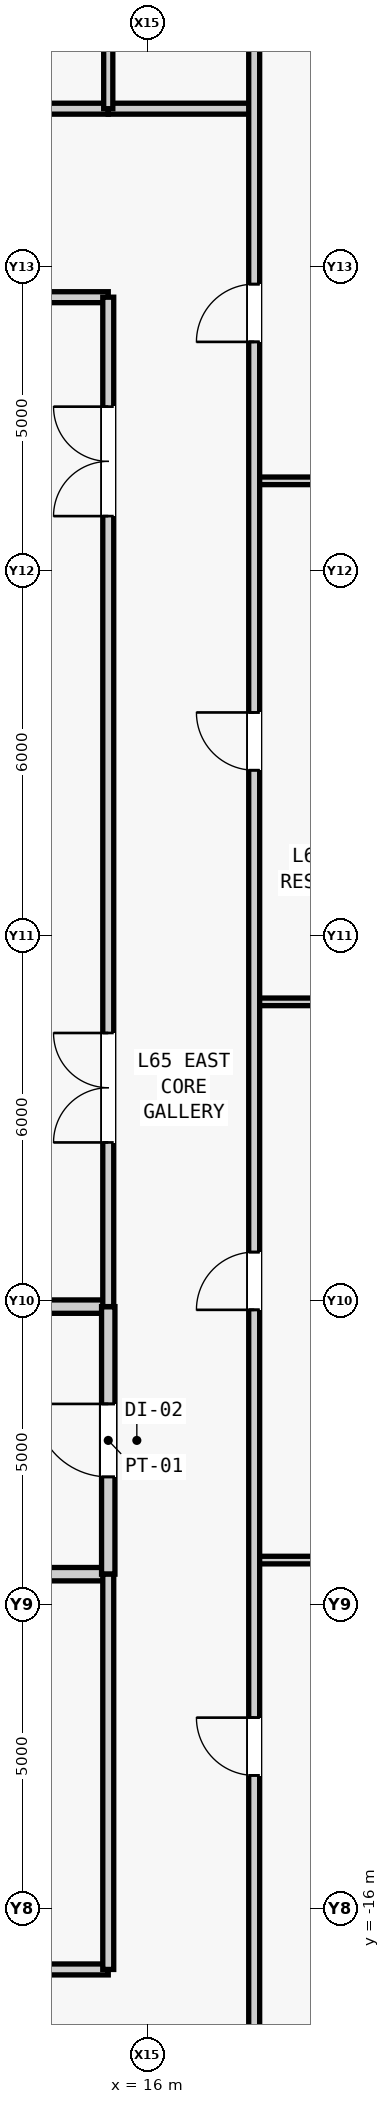
"""IFC4 building model, lengths in metres.
Left out: names, types, materials, properties, quantities, classifications, styles, units other than length and angle.
Written with IfcOpenShell. Run it as: python <this file> out.ifc"""

import sys

from ifc_helpers import new_model, si_unit, direction, frame, frame_2d, origin, place, context, subcontext, project, spatial, rectangle, extrude, source, transform, mapped, element, fill, save


model = new_model("IFC4")
c1 = context("Model", 3, precision=1e-05, world=origin(), true_north=direction((0.0, 1.0)))
c2 = subcontext(c1, "Body", "Model", "MODEL_VIEW")
j1 = project(units=[si_unit("LENGTHUNIT", "METRE"), si_unit("PLANEANGLEUNIT", "RADIAN")], contexts=[c1])
p1 = place(None, origin())
s1 = spatial("IfcSite", under=j1, at=p1, CompositionType="ELEMENT")
p2 = place(p1, origin())
s2 = spatial("IfcBuilding", under=s1, at=p2, CompositionType="ELEMENT")
p3 = place(p2, frame((0.0, 0.0, 277.5)))
s3 = spatial("IfcBuildingStorey", under=s2, at=p3, CompositionType="ELEMENT", Elevation=277.5)
m1 = source(origin(), c2, "Body", "SweptSolid", [
    extrude(rectangle(XDim=4.05, YDim=0.22, at=frame_2d((2.025, 0.0))), origin(), (0.0, 0.0, 1.0), 3.78),
])
p4 = place(p3, frame((11.3, -10.5, 0.0), z_axis=(0.0, 0.0, 1.0), x_axis=(1.0, 0.0, 0.0)))
e1 = element("IfcWall", 1, at=p4, inside=s3, PredefinedType="PARTITIONING", context=c2, shape_type="MappedRepresentation", body=[
    mapped(m1, transform((0.0, 0.0, 0.0), scale=1.0)),
])
m2 = source(origin(), c2, "Body", "SweptSolid", [
    extrude(rectangle(XDim=4.05, YDim=0.22, at=frame_2d((2.025, 0.0))), origin(), (0.0, 0.0, 1.0), 3.085),
])
p5 = place(p3, frame((11.3, -6.1, 0.0), z_axis=(0.0, 0.0, 1.0), x_axis=(1.0, 0.0, 0.0)))
e2 = element("IfcWall", 2, at=p5, inside=s3, PredefinedType="PARTITIONING", context=c2, shape_type="MappedRepresentation", body=[
    mapped(m2, transform((0.0, 0.0, 0.0), scale=1.0)),
])
m3 = source(origin(), c2, "Body", "SweptSolid", [
    extrude(rectangle(XDim=4.4, YDim=0.22, at=frame_2d((2.2, 0.0))), origin(), (0.0, 0.0, 1.0), 3.78),
])
p6 = place(p3, frame((15.35, -10.5, 0.0), z_axis=(0.0, 0.0, 1.0), x_axis=(0.0, 1.0, 0.0)))
e3 = element("IfcWall", 3, at=p6, inside=s3, PredefinedType="PARTITIONING", context=c2, shape_type="MappedRepresentation", body=[
    mapped(m3, transform((0.0, 0.0, 0.0), scale=1.0)),
])
m4 = source(origin(), c2, "Body", "SweptSolid", [
    extrude(rectangle(XDim=1.2, YDim=2.2, at=frame_2d((0.6, 1.1))), frame((0.0, 0.12, 0.0), z_axis=(0.0, -1.0, 0.0), x_axis=(1.0, 0.0, 0.0)), (0.0, 0.0, 1.0), 0.24),
])
p7 = place(p6, frame((1.6, 0.0, 0.0)))
e4 = element("IfcOpeningElement", 4, at=p7, cuts=e3, PredefinedType="OPENING", context=c2, shape_type="MappedRepresentation", body=[
    mapped(m4, transform((0.0, 0.0, 0.0), scale=1.0)),
])
m5 = source(origin(), c2, "Body", "SweptSolid", [
    extrude(rectangle(XDim=4.05, YDim=0.18, at=frame_2d((2.025, 0.0))), origin(), (0.0, 0.0, 1.0), 3.78),
])
p8 = place(p3, frame((11.3, 10.5, 0.0), z_axis=(0.0, 0.0, 1.0), x_axis=(1.0, 0.0, 0.0)))
e5 = element("IfcWall", 5, at=p8, inside=s3, PredefinedType="PARTITIONING", context=c2, shape_type="MappedRepresentation", body=[
    mapped(m5, transform((0.0, 0.0, 0.0), scale=1.0)),
])
m6 = source(origin(), c2, "Body", "SweptSolid", [
    extrude(rectangle(XDim=16.6, YDim=0.18, at=frame_2d((8.3, 0.0))), origin(), (0.0, 0.0, 1.0), 3.78),
])
p9 = place(p3, frame((15.35, -6.1, 0.0), z_axis=(0.0, 0.0, 1.0), x_axis=(0.0, 1.0, 0.0)))
e6 = element("IfcWall", 6, at=p9, inside=s3, PredefinedType="PARTITIONING", context=c2, shape_type="MappedRepresentation", body=[
    mapped(m6, transform((0.0, 0.0, 0.0), scale=1.0)),
])
m7 = source(origin(), c2, "Body", "SweptSolid", [
    extrude(rectangle(XDim=1.8, YDim=2.25, at=frame_2d((0.9, 1.125))), frame((0.0, 0.1, 0.0), z_axis=(0.0, -1.0, 0.0), x_axis=(1.0, 0.0, 0.0)), (0.0, 0.0, 1.0), 0.2),
])
p10 = place(p9, frame((2.7, 0.0, 0.0)))
e7 = element("IfcOpeningElement", 7, at=p10, cuts=e6, PredefinedType="OPENING", context=c2, shape_type="MappedRepresentation", body=[
    mapped(m7, transform((0.0, 0.0, 0.0), scale=1.0)),
])
p11 = place(p9, frame((13.0, 0.0, 0.0)))
e8 = element("IfcOpeningElement", 8, at=p11, cuts=e6, PredefinedType="OPENING", context=c2, shape_type="MappedRepresentation", body=[
    mapped(m7, transform((0.0, 0.0, 0.0), scale=1.0)),
])
m8 = source(origin(), c2, "Body", "SweptSolid", [
    extrude(rectangle(XDim=14.05, YDim=0.18, at=frame_2d((7.025, 0.0))), origin(), (0.0, 0.0, 1.0), 3.78),
])
p12 = place(p3, frame((1.3, -17.0, 0.0), z_axis=(0.0, 0.0, 1.0), x_axis=(1.0, 0.0, 0.0)))
e9 = element("IfcWall", 9, at=p12, inside=s3, PredefinedType="PARTITIONING", context=c2, shape_type="MappedRepresentation", body=[
    mapped(m8, transform((0.0, 0.0, 0.0), scale=1.0)),
])
m9 = source(origin(), c2, "Body", "SweptSolid", [
    extrude(rectangle(XDim=0.9, YDim=2.15, at=frame_2d((0.45, 1.075))), frame((0.0, 0.1, 0.0), z_axis=(0.0, -1.0, 0.0), x_axis=(1.0, 0.0, 0.0)), (0.0, 0.0, 1.0), 0.2),
])
p13 = place(p12, frame((6.25, 0.0, 0.0)))
e10 = element("IfcOpeningElement", 10, at=p13, cuts=e9, PredefinedType="OPENING", context=c2, shape_type="MappedRepresentation", body=[
    mapped(m9, transform((0.0, 0.0, 0.0), scale=1.0)),
])
m10 = source(origin(), c2, "Body", "SweptSolid", [
    extrude(rectangle(XDim=6.5, YDim=0.18, at=frame_2d((3.25, 0.0))), origin(), (0.0, 0.0, 1.0), 3.78),
])
p14 = place(p3, frame((15.35, -17.0, 0.0), z_axis=(0.0, 0.0, 1.0), x_axis=(0.0, 1.0, 0.0)))
e11 = element("IfcWall", 11, at=p14, inside=s3, PredefinedType="PARTITIONING", context=c2, shape_type="MappedRepresentation", body=[
    mapped(m10, transform((0.0, 0.0, 0.0), scale=1.0)),
])
m11 = source(origin(), c2, "Body", "SweptSolid", [
    extrude(rectangle(XDim=2.4, YDim=0.18, at=frame_2d((1.2, 0.0))), origin(), (0.0, 0.0, 1.0), 3.78),
])
p15 = place(p3, frame((15.35, 13.6, 0.0), z_axis=(0.0, 0.0, 1.0), x_axis=(1.0, 0.0, 0.0)))
e12 = element("IfcWall", 12, at=p15, inside=s3, PredefinedType="PARTITIONING", context=c2, shape_type="MappedRepresentation", body=[
    mapped(m11, transform((0.0, 0.0, 0.0), scale=1.0)),
])
m12 = source(origin(), c2, "Body", "SweptSolid", [
    extrude(rectangle(XDim=32.75, YDim=0.18, at=frame_2d((16.375, 0.0))), origin(), (0.0, 0.0, 1.0), 3.78),
])
p16 = place(p3, frame((-17.4, 13.6, 0.0), z_axis=(0.0, 0.0, 1.0), x_axis=(1.0, 0.0, 0.0)))
e13 = element("IfcWall", 13, at=p16, inside=s3, PredefinedType="PARTITIONING", context=c2, shape_type="MappedRepresentation", body=[
    mapped(m12, transform((0.0, 0.0, 0.0), scale=1.0)),
])
m13 = source(origin(), c2, "Body", "SweptSolid", [
    extrude(rectangle(XDim=1.05, YDim=2.2, at=frame_2d((0.525, 1.1))), frame((0.0, 0.1, 0.0), z_axis=(0.0, -1.0, 0.0), x_axis=(1.0, 0.0, 0.0)), (0.0, 0.0, 1.0), 0.2),
])
p17 = place(p16, frame((27.075, 0.0, 0.0)))
e14 = element("IfcOpeningElement", 14, at=p17, cuts=e13, PredefinedType="OPENING", context=c2, shape_type="MappedRepresentation", body=[
    mapped(m13, transform((0.0, 0.0, 0.0), scale=1.0)),
])
m14 = source(origin(), c2, "Body", "SweptSolid", [
    extrude(rectangle(XDim=14.4, YDim=0.15, at=frame_2d((7.2, 0.0))), origin(), (0.0, 0.0, 1.0), 3.78),
])
p18 = place(p3, frame((15.35, 13.6, 0.0), z_axis=(0.0, 0.0, 1.0), x_axis=(0.0, 1.0, 0.0)))
e15 = element("IfcWall", 15, at=p18, inside=s3, PredefinedType="PARTITIONING", context=c2, shape_type="MappedRepresentation", body=[
    mapped(m14, transform((0.0, 0.0, 0.0), scale=1.0)),
])
m15 = source(origin(), c2, "Body", "SweptSolid", [
    extrude(rectangle(XDim=10.25, YDim=0.125, at=frame_2d((5.125, 0.0))), origin(), (0.0, 0.0, 1.0), 3.78),
])
for number, where, z_axis, x_axis in (
    (16, (17.75, -10.268, 0.0), (0.0, 0.0, 1.0), (1.0, 0.0, 0.0)),
    (17, (17.75, -1.088, 0.0), (0.0, 0.0, 1.0), (1.0, 0.0, 0.0)),
    (18, (17.75, 7.48, 0.0), (0.0, 0.0, 1.0), (1.0, 0.0, 0.0)),
):
    element("IfcWall", number, at=place(p3, frame(where, z_axis=z_axis, x_axis=x_axis)), inside=s3, PredefinedType="PARTITIONING", context=c2, shape_type="MappedRepresentation", body=[
        mapped(m15, transform((0.0, 0.0, 0.0), scale=1.0)),
    ])
m16 = source(origin(), c2, "Body", "SweptSolid", [
    extrude(rectangle(XDim=41.9, YDim=0.18, at=frame_2d((20.95, 0.0))), origin(), (0.0, 0.0, 1.0), 3.78),
])
p19 = place(p3, frame((17.75, -19.4, 0.0), z_axis=(0.0, 0.0, 1.0), x_axis=(0.0, 1.0, 0.0)))
e19 = element("IfcWall", 19, at=p19, inside=s3, PredefinedType="PARTITIONING", context=c2, shape_type="MappedRepresentation", body=[
    mapped(m16, transform((0.0, 0.0, 0.0), scale=1.0)),
])
m17 = source(origin(), c2, "Body", "SweptSolid", [
    extrude(rectangle(XDim=0.95, YDim=2.15, at=frame_2d((0.475, 1.075))), frame((0.0, 0.1, 0.0), z_axis=(0.0, -1.0, 0.0), x_axis=(1.0, 0.0, 0.0)), (0.0, 0.0, 1.0), 0.2),
])
p20 = place(p19, frame((5.591, 0.0, 0.0)))
e20 = element("IfcOpeningElement", 20, at=p20, cuts=e19, PredefinedType="OPENING", context=c2, shape_type="MappedRepresentation", body=[
    mapped(m17, transform((0.0, 0.0, 0.0), scale=1.0)),
])
p21 = place(p19, frame((13.247, 0.0, 0.0)))
e21 = element("IfcOpeningElement", 21, at=p21, cuts=e19, PredefinedType="OPENING", context=c2, shape_type="MappedRepresentation", body=[
    mapped(m17, transform((0.0, 0.0, 0.0), scale=1.0)),
])
p22 = place(p19, frame((22.121, 0.0, 0.0)))
e22 = element("IfcOpeningElement", 22, at=p22, cuts=e19, PredefinedType="OPENING", context=c2, shape_type="MappedRepresentation", body=[
    mapped(m17, transform((0.0, 0.0, 0.0), scale=1.0)),
])
p23 = place(p19, frame((29.165, 0.0, 0.0)))
e23 = element("IfcOpeningElement", 23, at=p23, cuts=e19, PredefinedType="OPENING", context=c2, shape_type="MappedRepresentation", body=[
    mapped(m17, transform((0.0, 0.0, 0.0), scale=1.0)),
])
m18 = source(origin(), c2, "Body", "SweptSolid", [
    extrude(rectangle(XDim=1.2, YDim=2.2, at=frame_2d((0.6, 1.1))), frame((0.0, 0.025, 0.0), z_axis=(0.0, -1.0, 0.0), x_axis=(1.0, 0.0, 0.0)), (0.0, 0.0, 1.0), 0.05),
])
p24 = place(p7, origin())
e24 = element("IfcDoor", 24, at=p24, inside=s3, OperationType="SINGLE_SWING_RIGHT", PredefinedType="DOOR", context=c2, shape_type="MappedRepresentation", body=[
    mapped(m18, transform((0.0, 0.0, 0.0), scale=1.0)),
])
fill(e4, e24)
m19 = source(origin(), c2, "Body", "SweptSolid", [
    extrude(rectangle(XDim=1.8, YDim=2.25, at=frame_2d((0.9, 1.125))), frame((0.0, 0.025, 0.0), z_axis=(0.0, -1.0, 0.0), x_axis=(1.0, 0.0, 0.0)), (0.0, 0.0, 1.0), 0.05),
])
p25 = place(p10, origin())
e25 = element("IfcDoor", 25, at=p25, inside=s3, OperationType="SINGLE_SWING_RIGHT", PredefinedType="DOOR", context=c2, shape_type="MappedRepresentation", body=[
    mapped(m19, transform((0.0, 0.0, 0.0), scale=1.0)),
])
fill(e7, e25)
p26 = place(p11, origin())
e26 = element("IfcDoor", 26, at=p26, inside=s3, OperationType="SINGLE_SWING_LEFT", PredefinedType="DOOR", context=c2, shape_type="MappedRepresentation", body=[
    mapped(m19, transform((0.0, 0.0, 0.0), scale=1.0)),
])
fill(e8, e26)
m20 = source(origin(), c2, "Body", "SweptSolid", [
    extrude(rectangle(XDim=0.95, YDim=2.15, at=frame_2d((0.475, 1.075))), frame((0.0, 0.025, 0.0), z_axis=(0.0, -1.0, 0.0), x_axis=(1.0, 0.0, 0.0)), (0.0, 0.0, 1.0), 0.05),
])
p27 = place(p20, origin())
e27 = element("IfcDoor", 27, at=p27, inside=s3, OperationType="SINGLE_SWING_RIGHT", PredefinedType="DOOR", context=c2, shape_type="MappedRepresentation", body=[
    mapped(m20, transform((0.0, 0.0, 0.0), scale=1.0)),
])
fill(e20, e27)
p28 = place(p21, origin())
e28 = element("IfcDoor", 28, at=p28, inside=s3, OperationType="SINGLE_SWING_LEFT", PredefinedType="DOOR", context=c2, shape_type="MappedRepresentation", body=[
    mapped(m20, transform((0.0, 0.0, 0.0), scale=1.0)),
])
fill(e21, e28)
p29 = place(p22, origin())
e29 = element("IfcDoor", 29, at=p29, inside=s3, OperationType="SINGLE_SWING_RIGHT", PredefinedType="DOOR", context=c2, shape_type="MappedRepresentation", body=[
    mapped(m20, transform((0.0, 0.0, 0.0), scale=1.0)),
])
fill(e22, e29)
p30 = place(p23, origin())
e30 = element("IfcDoor", 30, at=p30, inside=s3, OperationType="SINGLE_SWING_LEFT", PredefinedType="DOOR", context=c2, shape_type="MappedRepresentation", body=[
    mapped(m20, transform((0.0, 0.0, 0.0), scale=1.0)),
])
fill(e23, e30)
save(model, sys.argv[1])
